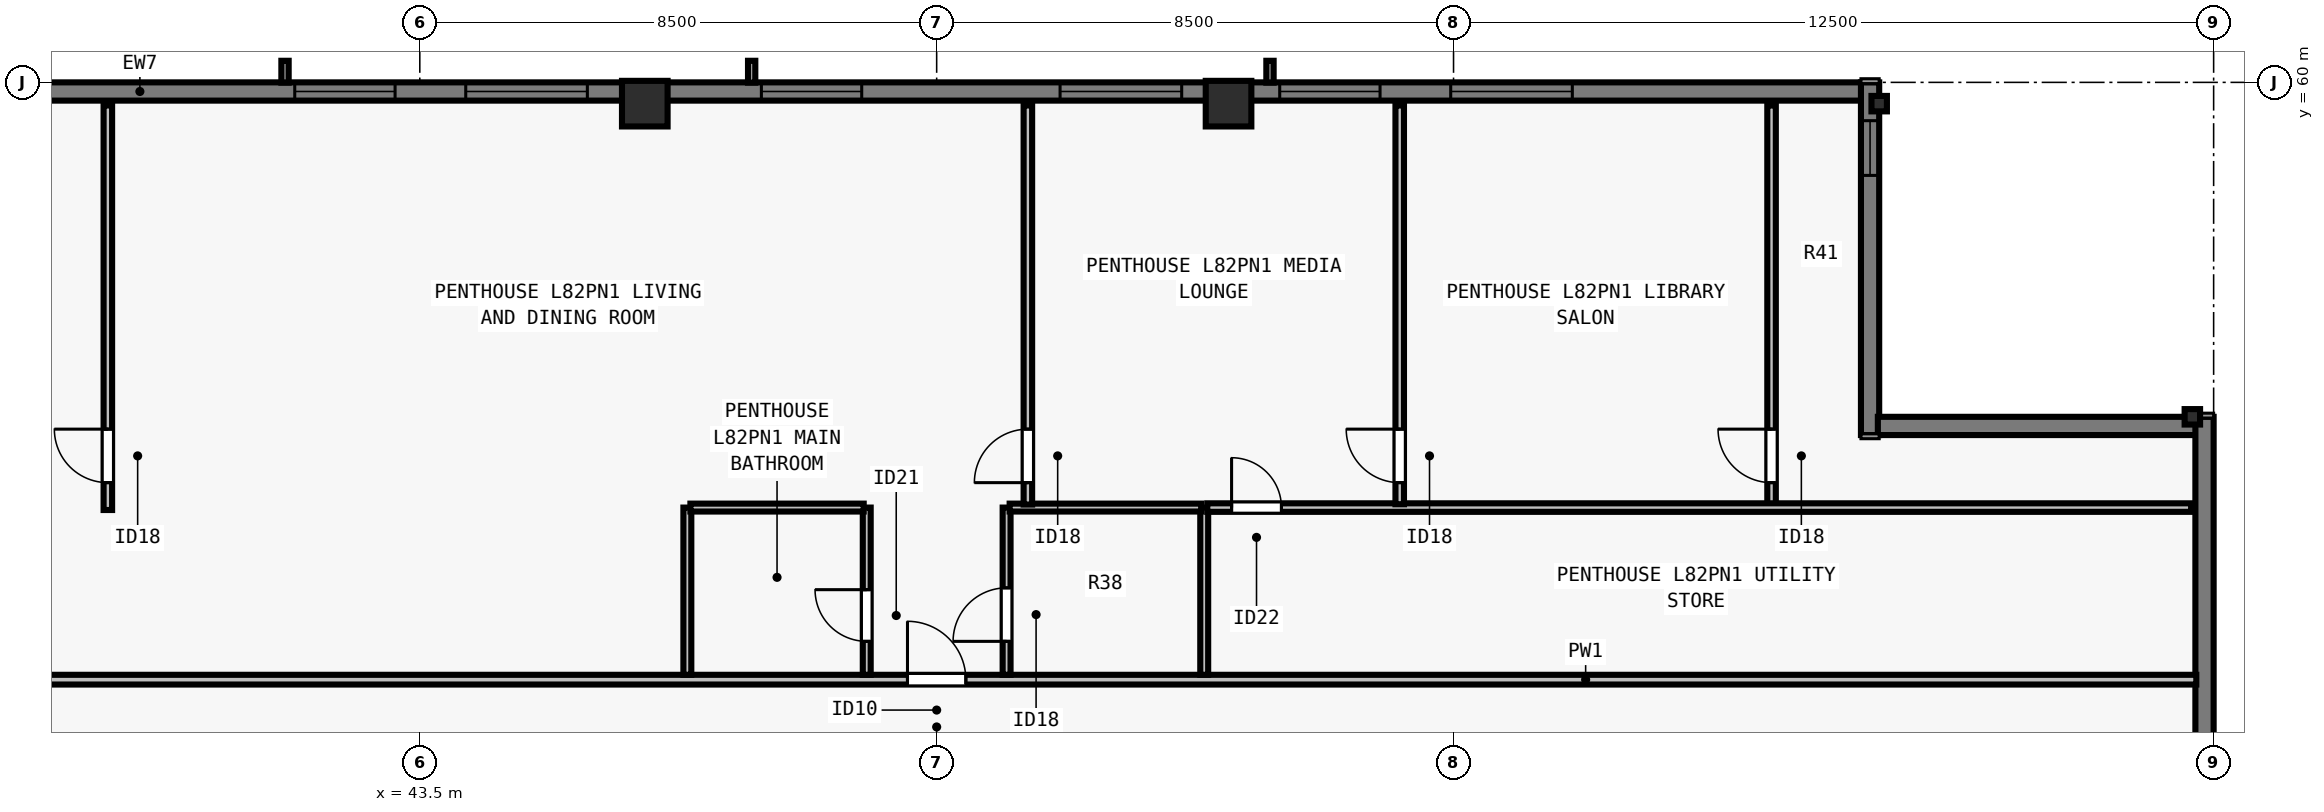
"""IFC4 building model, lengths in metres.
Left out: names, types, materials, properties, quantities, classifications, styles, units other than length and angle.
Written with IfcOpenShell. Run it as: python <this file> out.ifc"""

import sys

from ifc_helpers import new_model, si_unit, direction, frame, frame_2d, origin, origin_2d, place, context, subcontext, project, spatial, rectangle, i_section, extrude, element, fill, save


model = new_model("IFC4")
c1 = context("Model", 3, precision=1e-05, world=origin(), true_north=direction((0.0, 1.0)))
c2 = subcontext(c1, "Body", "Model", "MODEL_VIEW")
j1 = project(units=[si_unit("LENGTHUNIT", "METRE"), si_unit("PLANEANGLEUNIT", "RADIAN")], contexts=[c1])
p1 = place(None, origin())
s1 = spatial("IfcSite", under=j1, at=p1, CompositionType="ELEMENT")
p2 = place(p1, origin())
s2 = spatial("IfcBuilding", under=s1, at=p2, CompositionType="ELEMENT")
p3 = place(p2, frame((0.0, 0.0, 298.0)))
s3 = spatial("IfcBuildingStorey", under=s2, at=p3, CompositionType="ELEMENT", Elevation=298.0)
for number, where, z_axis, x_axis in (
    (1, (72.65, 54.5, 0.0), (0.0, 0.0, 1.0), (0.0, 1.0, 0.0)),
    (2, (67.5, 59.65, 0.0), (0.0, 0.0, 1.0), (1.0, 0.0, 0.0)),
):
    element("IfcColumn", number, at=place(p3, frame(where, z_axis=z_axis, x_axis=x_axis)), inside=s3, PredefinedType="COLUMN", context=c2, shape_type="SweptSolid", body=[
        extrude(i_section(OverallWidth=0.254, OverallDepth=0.254, WebThickness=0.009, FlangeThickness=0.014, FilletRadius=0.013, at=origin_2d()), origin(), (0.0, 0.0, 1.0), 3.5),
    ])
for number, where, z_axis, x_axis in (
    (3, (56.8, 59.65, 0.0), (0.0, 0.0, 1.0), (1.0, 0.0, 0.0)),
    (4, (47.2, 59.65, 0.0), (0.0, 0.0, 1.0), (1.0, 0.0, 0.0)),
):
    element("IfcColumn", number, at=place(p3, frame(where, z_axis=z_axis, x_axis=x_axis)), inside=s3, PredefinedType="COLUMN", context=c2, shape_type="SweptSolid", body=[
        extrude(rectangle(XDim=0.75, YDim=0.75, at=origin_2d()), origin(), (0.0, 0.0, 1.0), 3.5),
    ])
p4 = place(p3, frame((36.5, 59.85, 0.0), z_axis=(0.0, 0.0, 1.0), x_axis=(1.0, 0.0, 0.0)))
e5 = element("IfcWall", 5, at=p4, inside=s3, PredefinedType="SOLIDWALL", context=c2, shape_type="SweptSolid", body=[
    extrude(rectangle(XDim=30.722, YDim=0.3, at=frame_2d((15.361, 0.0))), origin(), (0.0, 0.0, 1.0), 3.29),
])
p5 = place(p4, frame((4.944, 0.0, 0.8)))
e6 = element("IfcOpeningElement", 6, at=p5, cuts=e5, PredefinedType="OPENING", context=c2, shape_type="SweptSolid", body=[
    extrude(rectangle(XDim=1.65, YDim=1.758, at=frame_2d((0.825, 0.879))), frame((0.0, 0.16, 0.0), z_axis=(0.0, -1.0, 0.0), x_axis=(1.0, 0.0, 0.0)), (0.0, 0.0, 1.0), 0.32),
])
p6 = place(p4, frame((7.756, 0.0, 0.8)))
e7 = element("IfcOpeningElement", 7, at=p6, cuts=e5, PredefinedType="OPENING", context=c2, shape_type="SweptSolid", body=[
    extrude(rectangle(XDim=2.0, YDim=1.758, at=frame_2d((1.0, 0.879))), frame((0.0, 0.16, 0.0), z_axis=(0.0, -1.0, 0.0), x_axis=(1.0, 0.0, 0.0)), (0.0, 0.0, 1.0), 0.32),
])
p7 = place(p4, frame((12.617, 0.0, 0.8)))
e8 = element("IfcOpeningElement", 8, at=p7, cuts=e5, PredefinedType="OPENING", context=c2, shape_type="SweptSolid", body=[
    extrude(rectangle(XDim=1.65, YDim=1.758, at=frame_2d((0.825, 0.879))), frame((0.0, 0.16, 0.0), z_axis=(0.0, -1.0, 0.0), x_axis=(1.0, 0.0, 0.0)), (0.0, 0.0, 1.0), 0.32),
])
p8 = place(p4, frame((17.53, 0.0, 0.8)))
e9 = element("IfcOpeningElement", 9, at=p8, cuts=e5, PredefinedType="OPENING", context=c2, shape_type="SweptSolid", body=[
    extrude(rectangle(XDim=2.0, YDim=1.758, at=frame_2d((1.0, 0.879))), frame((0.0, 0.16, 0.0), z_axis=(0.0, -1.0, 0.0), x_axis=(1.0, 0.0, 0.0)), (0.0, 0.0, 1.0), 0.32),
])
p9 = place(p4, frame((21.142, 0.0, 0.8)))
e10 = element("IfcOpeningElement", 10, at=p9, cuts=e5, PredefinedType="OPENING", context=c2, shape_type="SweptSolid", body=[
    extrude(rectangle(XDim=1.65, YDim=1.758, at=frame_2d((0.825, 0.879))), frame((0.0, 0.16, 0.0), z_axis=(0.0, -1.0, 0.0), x_axis=(1.0, 0.0, 0.0)), (0.0, 0.0, 1.0), 0.32),
])
p10 = place(p4, frame((23.954, 0.0, 0.8)))
e11 = element("IfcOpeningElement", 11, at=p10, cuts=e5, PredefinedType="OPENING", context=c2, shape_type="SweptSolid", body=[
    extrude(rectangle(XDim=2.0, YDim=1.758, at=frame_2d((1.0, 0.879))), frame((0.0, 0.16, 0.0), z_axis=(0.0, -1.0, 0.0), x_axis=(1.0, 0.0, 0.0)), (0.0, 0.0, 1.0), 0.32),
])
p11 = place(p3, frame((67.35, 60.0, 0.0), z_axis=(0.0, 0.0, 1.0), x_axis=(0.0, -1.0, 0.0)))
e12 = element("IfcWall", 12, at=p11, inside=s3, PredefinedType="SOLIDWALL", context=c2, shape_type="SweptSolid", body=[
    extrude(rectangle(XDim=5.8, YDim=0.3, at=frame_2d((2.9, 0.0))), origin(), (0.0, 0.0, 1.0), 3.29),
])
p12 = place(p11, frame((0.63, 0.0, 0.8)))
e13 = element("IfcOpeningElement", 13, at=p12, cuts=e12, PredefinedType="OPENING", context=c2, shape_type="SweptSolid", body=[
    extrude(rectangle(XDim=0.9, YDim=1.75, at=frame_2d((0.45, 0.875))), frame((0.0, 0.16, 0.0), z_axis=(0.0, -1.0, 0.0), x_axis=(1.0, 0.0, 0.0)), (0.0, 0.0, 1.0), 0.32),
])
p13 = place(p3, frame((67.478, 54.35, 0.0), z_axis=(0.0, 0.0, 1.0), x_axis=(1.0, 0.0, 0.0)))
e14 = element("IfcWall", 14, at=p13, inside=s3, PredefinedType="SOLIDWALL", context=c2, shape_type="SweptSolid", body=[
    extrude(rectangle(XDim=5.244, YDim=0.3, at=frame_2d((2.622, 0.0))), origin(), (0.0, 0.0, 1.0), 3.29),
])
p14 = place(p3, frame((72.85, 54.5, 0.0), z_axis=(0.0, 0.0, 1.0), x_axis=(0.0, -1.0, 0.0)))
e15 = element("IfcWall", 15, at=p14, inside=s3, PredefinedType="SOLIDWALL", context=c2, shape_type="SweptSolid", body=[
    extrude(rectangle(XDim=20.622, YDim=0.3, at=frame_2d((10.311, 0.0))), origin(), (0.0, 0.0, 1.0), 3.29),
])
p15 = place(p14, frame((7.821, 0.0, 0.8)))
e16 = element("IfcOpeningElement", 16, at=p15, cuts=e15, PredefinedType="OPENING", context=c2, shape_type="SweptSolid", body=[
    extrude(rectangle(XDim=2.0, YDim=1.758, at=frame_2d((1.0, 0.879))), frame((0.0, 0.16, 0.0), z_axis=(0.0, -1.0, 0.0), x_axis=(1.0, 0.0, 0.0)), (0.0, 0.0, 1.0), 0.32),
])
p16 = place(p14, frame((12.726, 0.0, 0.8)))
e17 = element("IfcOpeningElement", 17, at=p16, cuts=e15, PredefinedType="OPENING", context=c2, shape_type="SweptSolid", body=[
    extrude(rectangle(XDim=1.65, YDim=1.758, at=frame_2d((0.825, 0.879))), frame((0.0, 0.16, 0.0), z_axis=(0.0, -1.0, 0.0), x_axis=(1.0, 0.0, 0.0)), (0.0, 0.0, 1.0), 0.32),
])
p17 = place(p14, frame((16.432, 0.0, 0.8)))
e18 = element("IfcOpeningElement", 18, at=p17, cuts=e15, PredefinedType="OPENING", context=c2, shape_type="SweptSolid", body=[
    extrude(rectangle(XDim=2.0, YDim=1.758, at=frame_2d((1.0, 0.879))), frame((0.0, 0.16, 0.0), z_axis=(0.0, -1.0, 0.0), x_axis=(1.0, 0.0, 0.0)), (0.0, 0.0, 1.0), 0.32),
])
p18 = place(p3, frame((31.285, 50.177, 0.0), z_axis=(0.0, 0.0, 1.0), x_axis=(1.0, 0.0, 0.0)))
e19 = element("IfcWall", 19, at=p18, inside=s3, PredefinedType="PARTITIONING", context=c2, shape_type="SweptSolid", body=[
    extrude(rectangle(XDim=41.43, YDim=0.16, at=frame_2d((20.715, 0.0))), origin(), (0.0, 0.0, 1.0), 3.009),
])
p19 = place(p18, frame((20.235, 0.0, 0.0)))
e20 = element("IfcOpeningElement", 20, at=p19, cuts=e19, PredefinedType="OPENING", context=c2, shape_type="SweptSolid", body=[
    extrude(rectangle(XDim=0.96, YDim=2.18, at=frame_2d((0.48, 1.09))), frame((0.0, 0.09, 0.0), z_axis=(0.0, -1.0, 0.0), x_axis=(1.0, 0.0, 0.0)), (0.0, 0.0, 1.0), 0.18),
])
p20 = place(p3, frame((47.9, 50.258, 0.0), z_axis=(0.0, 0.0, 1.0), x_axis=(0.0, 1.0, 0.0)))
e21 = element("IfcWall", 21, at=p20, inside=s3, PredefinedType="PLUMBINGWALL", context=c2, shape_type="SweptSolid", body=[
    extrude(rectangle(XDim=2.75, YDim=0.13, at=frame_2d((1.375, 0.0))), origin(), (0.0, 0.0, 1.0), 3.29),
])
p21 = place(p3, frame((50.85, 50.258, 0.0), z_axis=(0.0, 0.0, 1.0), x_axis=(0.0, 1.0, 0.0)))
e22 = element("IfcWall", 22, at=p21, inside=s3, PredefinedType="PLUMBINGWALL", context=c2, shape_type="SweptSolid", body=[
    extrude(rectangle(XDim=2.75, YDim=0.13, at=frame_2d((1.375, 0.0))), origin(), (0.0, 0.0, 1.0), 3.009),
])
p22 = place(p21, frame((0.55, 0.0, 0.0)))
e23 = element("IfcOpeningElement", 23, at=p22, cuts=e22, PredefinedType="OPENING", context=c2, shape_type="SweptSolid", body=[
    extrude(rectangle(XDim=0.85, YDim=2.08, at=frame_2d((0.425, 1.04))), frame((0.0, 0.075, 0.0), z_axis=(0.0, -1.0, 0.0), x_axis=(1.0, 0.0, 0.0)), (0.0, 0.0, 1.0), 0.15),
])
p23 = place(p3, frame((47.95, 53.008, 0.0), z_axis=(0.0, 0.0, 1.0), x_axis=(1.0, 0.0, 0.0)))
e24 = element("IfcWall", 24, at=p23, inside=s3, PredefinedType="PLUMBINGWALL", context=c2, shape_type="SweptSolid", body=[
    extrude(rectangle(XDim=2.85, YDim=0.13, at=frame_2d((1.425, 0.0))), origin(), (0.0, 0.0, 1.0), 3.29),
])
p24 = place(p3, frame((56.4, 50.258, 0.0), z_axis=(0.0, 0.0, 1.0), x_axis=(0.0, 1.0, 0.0)))
e25 = element("IfcWall", 25, at=p24, inside=s3, PredefinedType="PLUMBINGWALL", context=c2, shape_type="SweptSolid", body=[
    extrude(rectangle(XDim=2.75, YDim=0.13, at=frame_2d((1.375, 0.0))), origin(), (0.0, 0.0, 1.0), 3.29),
])
p25 = place(p3, frame((53.15, 50.258, 0.0), z_axis=(0.0, 0.0, 1.0), x_axis=(0.0, 1.0, 0.0)))
e26 = element("IfcWall", 26, at=p25, inside=s3, PredefinedType="PLUMBINGWALL", context=c2, shape_type="SweptSolid", body=[
    extrude(rectangle(XDim=2.75, YDim=0.13, at=frame_2d((1.375, 0.0))), origin(), (0.0, 0.0, 1.0), 3.29),
])
p26 = place(p25, frame((0.55, 0.0, 0.0)))
e27 = element("IfcOpeningElement", 27, at=p26, cuts=e26, PredefinedType="OPENING", context=c2, shape_type="SweptSolid", body=[
    extrude(rectangle(XDim=0.88, YDim=2.1, at=frame_2d((0.44, 1.05))), frame((0.0, 0.075, 0.0), z_axis=(0.0, -1.0, 0.0), x_axis=(1.0, 0.0, 0.0)), (0.0, 0.0, 1.0), 0.15),
])
p27 = place(p3, frame((53.2, 53.008, 0.0), z_axis=(0.0, 0.0, 1.0), x_axis=(1.0, 0.0, 0.0)))
e28 = element("IfcWall", 28, at=p27, inside=s3, PredefinedType="PLUMBINGWALL", context=c2, shape_type="SweptSolid", body=[
    extrude(rectangle(XDim=3.15, YDim=0.13, at=frame_2d((1.575, 0.0))), origin(), (0.0, 0.0, 1.0), 3.29),
])
p28 = place(p3, frame((38.37, 52.968, 0.0), z_axis=(0.0, 0.0, 1.0), x_axis=(0.0, 1.0, 0.0)))
e29 = element("IfcWall", 29, at=p28, inside=s3, PredefinedType="PARTITIONING", context=c2, shape_type="SweptSolid", body=[
    extrude(rectangle(XDim=6.653, YDim=0.14, at=frame_2d((3.326, 0.0))), origin(), (0.0, 0.0, 1.0), 2.653),
])
p29 = place(p28, frame((0.45, 0.0, 0.0)))
e30 = element("IfcOpeningElement", 30, at=p29, cuts=e29, PredefinedType="OPENING", context=c2, shape_type="SweptSolid", body=[
    extrude(rectangle(XDim=0.88, YDim=2.1, at=frame_2d((0.44, 1.05))), frame((0.0, 0.08, 0.0), z_axis=(0.0, -1.0, 0.0), x_axis=(1.0, 0.0, 0.0)), (0.0, 0.0, 1.0), 0.16),
])
p30 = place(p3, frame((65.73, 52.968, 0.0), z_axis=(0.0, 0.0, 1.0), x_axis=(0.0, 1.0, 0.0)))
e31 = element("IfcWall", 31, at=p30, inside=s3, PredefinedType="PARTITIONING", context=c2, shape_type="SweptSolid", body=[
    extrude(rectangle(XDim=6.653, YDim=0.14, at=frame_2d((3.326, 0.0))), origin(), (0.0, 0.0, 1.0), 2.653),
])
p31 = place(p30, frame((0.45, 0.0, 0.0)))
e32 = element("IfcOpeningElement", 32, at=p31, cuts=e31, PredefinedType="OPENING", context=c2, shape_type="SweptSolid", body=[
    extrude(rectangle(XDim=0.88, YDim=2.1, at=frame_2d((0.44, 1.05))), frame((0.0, 0.08, 0.0), z_axis=(0.0, -1.0, 0.0), x_axis=(1.0, 0.0, 0.0)), (0.0, 0.0, 1.0), 0.16),
])
p32 = place(p3, frame((56.45, 53.008, 0.0), z_axis=(0.0, 0.0, 1.0), x_axis=(1.0, 0.0, 0.0)))
e33 = element("IfcWall", 33, at=p32, inside=s3, PredefinedType="PARTITIONING", context=c2, shape_type="SweptSolid", body=[
    extrude(rectangle(XDim=16.18, YDim=0.14, at=frame_2d((8.09, 0.0))), origin(), (0.0, 0.0, 1.0), 3.009),
])
p33 = place(p32, frame((0.4, 0.0, 0.0)))
e34 = element("IfcOpeningElement", 34, at=p33, cuts=e33, PredefinedType="OPENING", context=c2, shape_type="SweptSolid", body=[
    extrude(rectangle(XDim=0.82, YDim=2.1, at=frame_2d((0.41, 1.05))), frame((0.0, 0.08, 0.0), z_axis=(0.0, -1.0, 0.0), x_axis=(1.0, 0.0, 0.0)), (0.0, 0.0, 1.0), 0.16),
])
p34 = place(p3, frame((53.5, 53.058, 0.0), z_axis=(0.0, 0.0, 1.0), x_axis=(0.0, 1.0, 0.0)))
e35 = element("IfcWall", 35, at=p34, inside=s3, PredefinedType="PARTITIONING", context=c2, shape_type="SweptSolid", body=[
    extrude(rectangle(XDim=6.562, YDim=0.14, at=frame_2d((3.281, 0.0))), origin(), (0.0, 0.0, 1.0), 3.009),
])
p35 = place(p34, frame((0.36, 0.0, 0.0)))
e36 = element("IfcOpeningElement", 36, at=p35, cuts=e35, PredefinedType="OPENING", context=c2, shape_type="SweptSolid", body=[
    extrude(rectangle(XDim=0.88, YDim=2.1, at=frame_2d((0.44, 1.05))), frame((0.0, 0.08, 0.0), z_axis=(0.0, -1.0, 0.0), x_axis=(1.0, 0.0, 0.0)), (0.0, 0.0, 1.0), 0.16),
])
p36 = place(p3, frame((59.615, 53.062, 0.0), z_axis=(0.0, 0.0, 1.0), x_axis=(0.0, 1.0, 0.0)))
e37 = element("IfcWall", 37, at=p36, inside=s3, PredefinedType="PARTITIONING", context=c2, shape_type="SweptSolid", body=[
    extrude(rectangle(XDim=6.558, YDim=0.14, at=frame_2d((3.279, 0.0))), origin(), (0.0, 0.0, 1.0), 3.29),
])
p37 = place(p36, frame((0.355, 0.0, 0.0)))
e38 = element("IfcOpeningElement", 38, at=p37, cuts=e37, PredefinedType="OPENING", context=c2, shape_type="SweptSolid", body=[
    extrude(rectangle(XDim=0.88, YDim=2.1, at=frame_2d((0.44, 1.05))), frame((0.0, 0.08, 0.0), z_axis=(0.0, -1.0, 0.0), x_axis=(1.0, 0.0, 0.0)), (0.0, 0.0, 1.0), 0.16),
])
p38 = place(p5, origin())
e39 = element("IfcWindow", 39, at=p38, inside=s3, PartitioningType="SINGLE_PANEL", PredefinedType="WINDOW", context=c2, shape_type="SweptSolid", body=[
    extrude(rectangle(XDim=1.65, YDim=1.758, at=frame_2d((0.825, 0.879))), frame((0.0, -0.05, 0.0), z_axis=(0.0, -1.0, 0.0), x_axis=(1.0, 0.0, 0.0)), (0.0, 0.0, 1.0), 0.06),
])
fill(e6, e39)
p39 = place(p6, origin())
e40 = element("IfcWindow", 40, at=p39, inside=s3, PartitioningType="SINGLE_PANEL", PredefinedType="WINDOW", context=c2, shape_type="SweptSolid", body=[
    extrude(rectangle(XDim=2.0, YDim=1.758, at=frame_2d((1.0, 0.879))), frame((0.0, -0.05, 0.0), z_axis=(0.0, -1.0, 0.0), x_axis=(1.0, 0.0, 0.0)), (0.0, 0.0, 1.0), 0.06),
])
fill(e7, e40)
p40 = place(p7, origin())
e41 = element("IfcWindow", 41, at=p40, inside=s3, PartitioningType="SINGLE_PANEL", PredefinedType="WINDOW", context=c2, shape_type="SweptSolid", body=[
    extrude(rectangle(XDim=1.65, YDim=1.758, at=frame_2d((0.825, 0.879))), frame((0.0, -0.05, 0.0), z_axis=(0.0, -1.0, 0.0), x_axis=(1.0, 0.0, 0.0)), (0.0, 0.0, 1.0), 0.06),
])
fill(e8, e41)
p41 = place(p8, origin())
e42 = element("IfcWindow", 42, at=p41, inside=s3, PartitioningType="SINGLE_PANEL", PredefinedType="WINDOW", context=c2, shape_type="SweptSolid", body=[
    extrude(rectangle(XDim=2.0, YDim=1.758, at=frame_2d((1.0, 0.879))), frame((0.0, -0.05, 0.0), z_axis=(0.0, -1.0, 0.0), x_axis=(1.0, 0.0, 0.0)), (0.0, 0.0, 1.0), 0.06),
])
fill(e9, e42)
p42 = place(p9, origin())
e43 = element("IfcWindow", 43, at=p42, inside=s3, PartitioningType="SINGLE_PANEL", PredefinedType="WINDOW", context=c2, shape_type="SweptSolid", body=[
    extrude(rectangle(XDim=1.65, YDim=1.758, at=frame_2d((0.825, 0.879))), frame((0.0, -0.05, 0.0), z_axis=(0.0, -1.0, 0.0), x_axis=(1.0, 0.0, 0.0)), (0.0, 0.0, 1.0), 0.06),
])
fill(e10, e43)
p43 = place(p10, origin())
e44 = element("IfcWindow", 44, at=p43, inside=s3, PartitioningType="SINGLE_PANEL", PredefinedType="WINDOW", context=c2, shape_type="SweptSolid", body=[
    extrude(rectangle(XDim=2.0, YDim=1.758, at=frame_2d((1.0, 0.879))), frame((0.0, -0.05, 0.0), z_axis=(0.0, -1.0, 0.0), x_axis=(1.0, 0.0, 0.0)), (0.0, 0.0, 1.0), 0.06),
])
fill(e11, e44)
p44 = place(p12, origin())
e45 = element("IfcWindow", 45, at=p44, inside=s3, PartitioningType="SINGLE_PANEL", PredefinedType="WINDOW", context=c2, shape_type="SweptSolid", body=[
    extrude(rectangle(XDim=0.9, YDim=1.75, at=frame_2d((0.45, 0.875))), frame((0.0, -0.04, 0.0), z_axis=(0.0, -1.0, 0.0), x_axis=(1.0, 0.0, 0.0)), (0.0, 0.0, 1.0), 0.06),
])
fill(e13, e45)
p45 = place(p22, origin())
e46 = element("IfcDoor", 46, at=p45, inside=s3, OperationType="SINGLE_SWING_RIGHT", PredefinedType="DOOR", context=c2, shape_type="SweptSolid", body=[
    extrude(rectangle(XDim=0.85, YDim=2.08, at=frame_2d((0.425, 1.04))), frame((0.0, 0.025, 0.0), z_axis=(0.0, -1.0, 0.0), x_axis=(1.0, 0.0, 0.0)), (0.0, 0.0, 1.0), 0.05),
])
fill(e23, e46)
p46 = place(p26, origin())
e47 = element("IfcDoor", 47, at=p46, inside=s3, OperationType="SINGLE_SWING_LEFT", PredefinedType="DOOR", context=c2, shape_type="SweptSolid", body=[
    extrude(rectangle(XDim=0.88, YDim=2.1, at=frame_2d((0.44, 1.05))), frame((0.0, 0.025, 0.0), z_axis=(0.0, -1.0, 0.0), x_axis=(1.0, 0.0, 0.0)), (0.0, 0.0, 1.0), 0.05),
])
fill(e27, e47)
p47 = place(p29, origin())
e48 = element("IfcDoor", 48, at=p47, inside=s3, OperationType="SINGLE_SWING_RIGHT", PredefinedType="DOOR", context=c2, shape_type="SweptSolid", body=[
    extrude(rectangle(XDim=0.88, YDim=2.1, at=frame_2d((0.44, 1.05))), frame((0.0, 0.025, 0.0), z_axis=(0.0, -1.0, 0.0), x_axis=(1.0, 0.0, 0.0)), (0.0, 0.0, 1.0), 0.05),
])
fill(e30, e48)
p48 = place(p33, origin())
e49 = element("IfcDoor", 49, at=p48, inside=s3, OperationType="SINGLE_SWING_LEFT", PredefinedType="DOOR", context=c2, shape_type="SweptSolid", body=[
    extrude(rectangle(XDim=0.82, YDim=2.1, at=frame_2d((0.41, 1.05))), frame((0.0, 0.025, 0.0), z_axis=(0.0, -1.0, 0.0), x_axis=(1.0, 0.0, 0.0)), (0.0, 0.0, 1.0), 0.05),
])
fill(e34, e49)
p49 = place(p31, origin())
e50 = element("IfcDoor", 50, at=p49, inside=s3, OperationType="SINGLE_SWING_RIGHT", PredefinedType="DOOR", context=c2, shape_type="SweptSolid", body=[
    extrude(rectangle(XDim=0.88, YDim=2.1, at=frame_2d((0.44, 1.05))), frame((0.0, 0.025, 0.0), z_axis=(0.0, -1.0, 0.0), x_axis=(1.0, 0.0, 0.0)), (0.0, 0.0, 1.0), 0.05),
])
fill(e32, e50)
p50 = place(p35, origin())
e51 = element("IfcDoor", 51, at=p50, inside=s3, OperationType="SINGLE_SWING_LEFT", PredefinedType="DOOR", context=c2, shape_type="SweptSolid", body=[
    extrude(rectangle(XDim=0.88, YDim=2.1, at=frame_2d((0.44, 1.05))), frame((0.0, 0.025, 0.0), z_axis=(0.0, -1.0, 0.0), x_axis=(1.0, 0.0, 0.0)), (0.0, 0.0, 1.0), 0.05),
])
fill(e36, e51)
p51 = place(p37, origin())
e52 = element("IfcDoor", 52, at=p51, inside=s3, OperationType="SINGLE_SWING_RIGHT", PredefinedType="DOOR", context=c2, shape_type="SweptSolid", body=[
    extrude(rectangle(XDim=0.88, YDim=2.1, at=frame_2d((0.44, 1.05))), frame((0.0, 0.025, 0.0), z_axis=(0.0, -1.0, 0.0), x_axis=(1.0, 0.0, 0.0)), (0.0, 0.0, 1.0), 0.05),
])
fill(e38, e52)
p52 = place(p19, origin())
e53 = element("IfcDoor", 53, at=p52, inside=s3, OperationType="SINGLE_SWING_LEFT", PredefinedType="DOOR", context=c2, shape_type="SweptSolid", body=[
    extrude(rectangle(XDim=0.96, YDim=2.18, at=frame_2d((0.48, 1.09))), frame((0.0, 0.025, 0.0), z_axis=(0.0, -1.0, 0.0), x_axis=(1.0, 0.0, 0.0)), (0.0, 0.0, 1.0), 0.05),
])
fill(e20, e53)
save(model, sys.argv[1])
